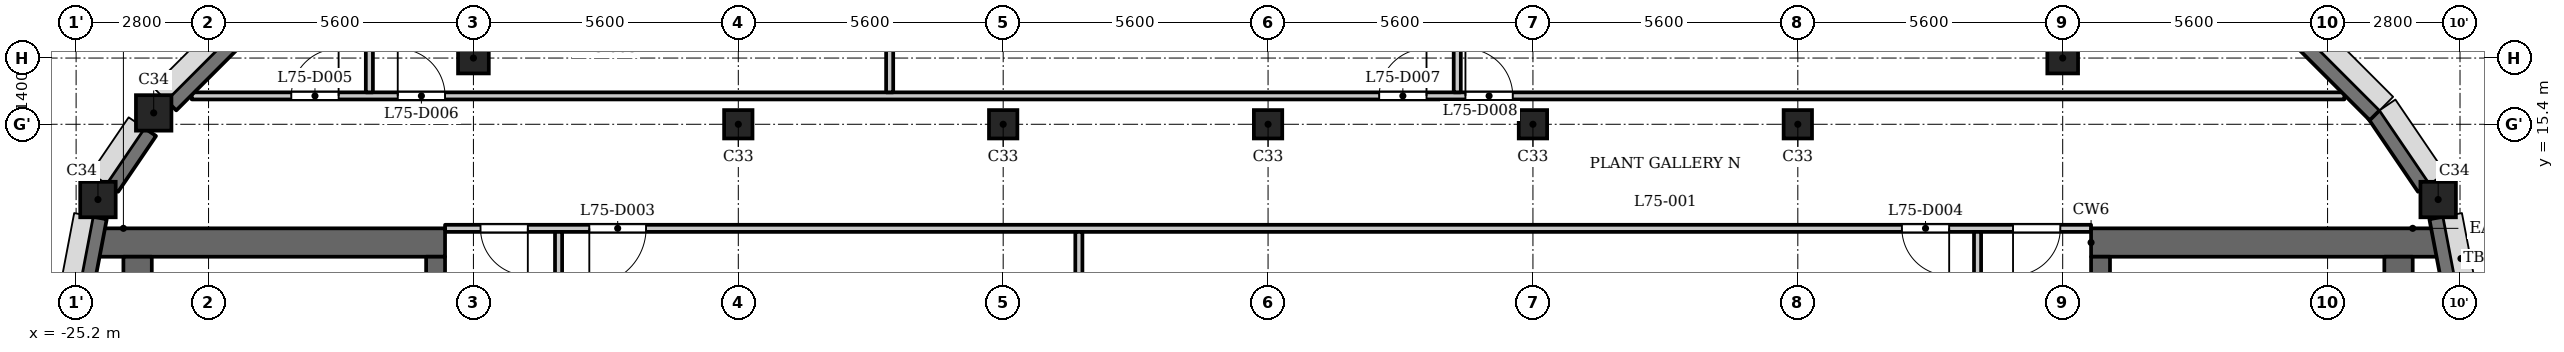
"""IFC4 building model, lengths in metres.
Left out: names, types, materials, properties, quantities, classifications, styles, units other than length and angle.
Written with IfcOpenShell. Run it as: python <this file> out.ifc"""

import sys

from ifc_helpers import new_model, si_unit, direction, frame, frame_2d, origin, origin_2d, place, context, subcontext, project, spatial, rectangle, extrude, element, fill, save


model = new_model("IFC4")
c1 = context("Model", 3, precision=1e-05, world=origin(), true_north=direction((0.0, 1.0)))
c2 = subcontext(c1, "Body", "Model", "MODEL_VIEW")
j1 = project(units=[si_unit("LENGTHUNIT", "METRE"), si_unit("PLANEANGLEUNIT", "RADIAN")], contexts=[c1])
p1 = place(None, origin())
s1 = spatial("IfcSite", under=j1, at=p1, CompositionType="ELEMENT")
p2 = place(p1, origin())
s2 = spatial("IfcBuilding", under=s1, at=p2, CompositionType="ELEMENT")
p3 = place(p2, frame((0.0, 0.0, 289.1)))
s3 = spatial("IfcBuildingStorey", under=s2, at=p3, CompositionType="ELEMENT", Elevation=289.1)
for number, where, z_axis, x_axis in (
    (1, (24.738, 13.809, 0.0), (0.0, 0.0, 1.0), (1.0, 0.0, 0.0)),
    (2, (-23.56, 15.64, 0.0), (0.0, 0.0, 1.0), (1.0, 0.0, 0.0)),
    (3, (-24.738, 13.809, 0.0), (0.0, 0.0, 1.0), (1.0, 0.0, 0.0)),
):
    element("IfcColumn", number, at=place(p3, frame(where, z_axis=z_axis, x_axis=x_axis)), inside=s3, PredefinedType="COLUMN", context=c2, shape_type="SweptSolid", body=[
        extrude(rectangle(XDim=0.75, YDim=0.75, at=origin_2d()), origin(), (0.0, 0.0, 1.0), 5.4),
    ])
for number, where, z_axis, x_axis in (
    (4, (-16.8, 16.8, 0.0), (0.0, 0.0, 1.0), (1.0, 0.0, 0.0)),
    (5, (16.8, 16.8, 0.0), (0.0, 0.0, 1.0), (1.0, 0.0, 0.0)),
):
    element("IfcColumn", number, at=place(p3, frame(where, z_axis=z_axis, x_axis=x_axis)), inside=s3, PredefinedType="COLUMN", context=c2, shape_type="SweptSolid", body=[
        extrude(rectangle(XDim=0.65, YDim=0.65, at=origin_2d()), origin(), (0.0, 0.0, 1.0), 5.4),
    ])
for number, where, z_axis, x_axis in (
    (6, (-11.2, 15.4, 0.0), (0.0, 0.0, 1.0), (1.0, 0.0, 0.0)),
    (7, (-5.6, 15.4, 0.0), (0.0, 0.0, 1.0), (1.0, 0.0, 0.0)),
    (8, (0.0, 15.4, 0.0), (0.0, 0.0, 1.0), (1.0, 0.0, 0.0)),
    (9, (5.6, 15.4, 0.0), (0.0, 0.0, 1.0), (1.0, 0.0, 0.0)),
    (10, (11.2, 15.4, 0.0), (0.0, 0.0, 1.0), (1.0, 0.0, 0.0)),
):
    element("IfcColumn", number, at=place(p3, frame(where, z_axis=z_axis, x_axis=x_axis)), inside=s3, PredefinedType="COLUMN", context=c2, shape_type="SweptSolid", body=[
        extrude(rectangle(XDim=0.6, YDim=0.6, at=origin_2d()), origin(), (0.0, 0.0, 1.0), 5.4),
    ])
p4 = place(p3, frame((25.053, 11.572, 0.0), z_axis=(0.0, 0.0, 1.0), x_axis=(-0.187398348234, 0.982284001233, 0.0)))
e11 = element("IfcWall", 11, at=p4, inside=s3, PredefinedType="SOLIDWALL", context=c2, shape_type="SweptSolid", body=[
    extrude(rectangle(XDim=1.881, YDim=0.3, at=frame_2d((0.941, 0.0))), origin(), (0.0, 0.0, 1.0), 3.2),
])
p5 = place(p3, frame((24.436, 14.057, 0.0), z_axis=(0.0, 0.0, 1.0), x_axis=(-0.562075713892, 0.827085782645, 0.0)))
e12 = element("IfcWall", 12, at=p5, inside=s3, PredefinedType="SOLIDWALL", context=c2, shape_type="SweptSolid", body=[
    extrude(rectangle(XDim=1.881, YDim=0.3, at=frame_2d((0.94, 0.0))), origin(), (0.0, 0.0, 1.0), 3.2),
])
for number, where, z_axis, x_axis in (
    (13, (23.397, 15.591, 0.0), (0.0, 0.0, 1.0), (-0.707, 0.707, 0.0)),
    (14, (-21.191, 17.797, 0.0), (0.0, 0.0, 1.0), (-0.707, -0.707, 0.0)),
):
    element("IfcWall", number, at=place(p3, frame(where, z_axis=z_axis, x_axis=x_axis)), inside=s3, PredefinedType="SOLIDWALL", context=c2, shape_type="SweptSolid", body=[
        extrude(rectangle(XDim=2.825, YDim=0.3, at=frame_2d((1.413, 0.0))), origin(), (0.0, 0.0, 1.0), 3.2),
    ])
p6 = place(p3, frame((-23.634, 15.237, 0.0), z_axis=(0.0, 0.0, 1.0), x_axis=(-0.562099454787, -0.827069648173, 0.0)))
e15 = element("IfcWall", 15, at=p6, inside=s3, PredefinedType="SOLIDWALL", context=c2, shape_type="SweptSolid", body=[
    extrude(rectangle(XDim=1.427, YDim=0.3, at=frame_2d((0.714, 0.0))), origin(), (0.0, 0.0, 1.0), 3.2),
])
p7 = place(p3, frame((-24.7, 13.42, 0.0), z_axis=(0.0, 0.0, 1.0), x_axis=(-0.187398348234, -0.982284001233, 0.0)))
e16 = element("IfcWall", 16, at=p7, inside=s3, PredefinedType="SOLIDWALL", context=c2, shape_type="SweptSolid", body=[
    extrude(rectangle(XDim=1.881, YDim=0.3, at=frame_2d((0.941, 0.0))), origin(), (0.0, 0.0, 1.0), 3.2),
])
p8 = place(p3, frame((-17.4, 12.9, 0.0), z_axis=(0.0, 0.0, 1.0), x_axis=(-1.0, 0.0, 0.0)))
e17 = element("IfcWall", 17, at=p8, inside=s3, PredefinedType="SHEAR", context=c2, shape_type="SweptSolid", body=[
    extrude(rectangle(XDim=7.32, YDim=0.6, at=frame_2d((3.66, 0.0))), origin(), (0.0, 0.0, 1.0), 5.0),
])
p9 = place(p3, frame((-17.6, -12.6, 0.0), z_axis=(0.0, 0.0, 1.0), x_axis=(0.0, 1.0, 0.0)))
e18 = element("IfcWall", 18, at=p9, inside=s3, PredefinedType="SHEAR", context=c2, shape_type="SweptSolid", body=[
    extrude(rectangle(XDim=25.2, YDim=0.4, at=frame_2d((12.6, 0.0))), origin(), (0.0, 0.0, 1.0), 5.0),
])
p10 = place(p9, frame((6.3, 0.0, 0.0)))
e19 = element("IfcOpeningElement", 19, at=p10, cuts=e18, PredefinedType="OPENING", context=c2, shape_type="SweptSolid", body=[
    extrude(rectangle(XDim=1.1, YDim=2.1, at=frame_2d((0.55, 1.05))), frame((0.0, 0.21, 0.0), z_axis=(0.0, -1.0, 0.0), x_axis=(1.0, 0.0, 0.0)), (0.0, 0.0, 1.0), 0.42),
])
p11 = place(p9, frame((8.7, 0.0, 0.0)))
e20 = element("IfcOpeningElement", 20, at=p11, cuts=e18, PredefinedType="OPENING", context=c2, shape_type="SweptSolid", body=[
    extrude(rectangle(XDim=1.1, YDim=2.1, at=frame_2d((0.55, 1.05))), frame((0.0, 0.21, 0.0), z_axis=(0.0, -1.0, 0.0), x_axis=(1.0, 0.0, 0.0)), (0.0, 0.0, 1.0), 0.42),
])
p12 = place(p9, frame((11.2, 0.0, 0.0)))
e21 = element("IfcOpeningElement", 21, at=p12, cuts=e18, PredefinedType="OPENING", context=c2, shape_type="SweptSolid", body=[
    extrude(rectangle(XDim=0.9, YDim=2.1, at=frame_2d((0.45, 1.05))), frame((0.0, 0.21, 0.0), z_axis=(0.0, -1.0, 0.0), x_axis=(1.0, 0.0, 0.0)), (0.0, 0.0, 1.0), 0.42),
])
p13 = place(p9, frame((17.05, 0.0, 0.0)))
e22 = element("IfcOpeningElement", 22, at=p13, cuts=e18, PredefinedType="OPENING", context=c2, shape_type="SweptSolid", body=[
    extrude(rectangle(XDim=0.9, YDim=2.1, at=frame_2d((0.45, 1.05))), frame((0.0, 0.21, 0.0), z_axis=(0.0, -1.0, 0.0), x_axis=(1.0, 0.0, 0.0)), (0.0, 0.0, 1.0), 0.42),
])
p14 = place(p9, frame((23.25, 0.0, 0.0)))
e23 = element("IfcOpeningElement", 23, at=p14, cuts=e18, PredefinedType="OPENING", context=c2, shape_type="SweptSolid", body=[
    extrude(rectangle(XDim=1.1, YDim=2.1, at=frame_2d((0.55, 1.05))), frame((0.0, 0.21, 0.0), z_axis=(0.0, -1.0, 0.0), x_axis=(1.0, 0.0, 0.0)), (0.0, 0.0, 1.0), 0.42),
])
p15 = place(p9, frame((0.85, 0.0, 0.0)))
e24 = element("IfcOpeningElement", 24, at=p15, cuts=e18, PredefinedType="OPENING", context=c2, shape_type="SweptSolid", body=[
    extrude(rectangle(XDim=1.1, YDim=2.1, at=frame_2d((0.55, 1.05))), frame((0.0, 0.21, 0.0), z_axis=(0.0, -1.0, 0.0), x_axis=(1.0, 0.0, 0.0)), (0.0, 0.0, 1.0), 0.42),
])
p16 = place(p9, frame((13.075, 0.0, 0.0)))
e25 = element("IfcOpeningElement", 25, at=p16, cuts=e18, PredefinedType="OPENING", context=c2, shape_type="SweptSolid", body=[
    extrude(rectangle(XDim=1.8, YDim=2.1, at=frame_2d((0.9, 1.05))), frame((0.0, 0.21, 0.0), z_axis=(0.0, -1.0, 0.0), x_axis=(1.0, 0.0, 0.0)), (0.0, 0.0, 1.0), 0.42),
])
p17 = place(p3, frame((-23.9, -12.6, 0.0), z_axis=(0.0, 0.0, 1.0), x_axis=(0.0, 1.0, 0.0)))
e26 = element("IfcWall", 26, at=p17, inside=s3, PredefinedType="SHEAR", context=c2, shape_type="SweptSolid", body=[
    extrude(rectangle(XDim=25.2, YDim=0.6, at=frame_2d((12.6, 0.0))), origin(), (0.0, 0.0, 1.0), 5.0),
])
p18 = place(p3, frame((17.4, 12.9, 0.0), z_axis=(0.0, 0.0, 1.0), x_axis=(1.0, 0.0, 0.0)))
e27 = element("IfcWall", 27, at=p18, inside=s3, PredefinedType="SHEAR", context=c2, shape_type="SweptSolid", body=[
    extrude(rectangle(XDim=7.32, YDim=0.6, at=frame_2d((3.66, 0.0))), origin(), (0.0, 0.0, 1.0), 5.0),
])
p19 = place(p3, frame((17.6, -12.6, 0.0), z_axis=(0.0, 0.0, 1.0), x_axis=(0.0, 1.0, 0.0)))
e28 = element("IfcWall", 28, at=p19, inside=s3, PredefinedType="SHEAR", context=c2, shape_type="SweptSolid", body=[
    extrude(rectangle(XDim=25.2, YDim=0.4, at=frame_2d((12.6, 0.0))), origin(), (0.0, 0.0, 1.0), 5.0),
])
p20 = place(p19, frame((6.3, 0.0, 0.0)))
e29 = element("IfcOpeningElement", 29, at=p20, cuts=e28, PredefinedType="OPENING", context=c2, shape_type="SweptSolid", body=[
    extrude(rectangle(XDim=1.1, YDim=2.1, at=frame_2d((0.55, 1.05))), frame((0.0, 0.21, 0.0), z_axis=(0.0, -1.0, 0.0), x_axis=(1.0, 0.0, 0.0)), (0.0, 0.0, 1.0), 0.42),
])
p21 = place(p19, frame((8.7, 0.0, 0.0)))
e30 = element("IfcOpeningElement", 30, at=p21, cuts=e28, PredefinedType="OPENING", context=c2, shape_type="SweptSolid", body=[
    extrude(rectangle(XDim=1.1, YDim=2.1, at=frame_2d((0.55, 1.05))), frame((0.0, 0.21, 0.0), z_axis=(0.0, -1.0, 0.0), x_axis=(1.0, 0.0, 0.0)), (0.0, 0.0, 1.0), 0.42),
])
p22 = place(p19, frame((11.2, 0.0, 0.0)))
e31 = element("IfcOpeningElement", 31, at=p22, cuts=e28, PredefinedType="OPENING", context=c2, shape_type="SweptSolid", body=[
    extrude(rectangle(XDim=0.9, YDim=2.1, at=frame_2d((0.45, 1.05))), frame((0.0, 0.21, 0.0), z_axis=(0.0, -1.0, 0.0), x_axis=(1.0, 0.0, 0.0)), (0.0, 0.0, 1.0), 0.42),
])
p23 = place(p19, frame((17.05, 0.0, 0.0)))
e32 = element("IfcOpeningElement", 32, at=p23, cuts=e28, PredefinedType="OPENING", context=c2, shape_type="SweptSolid", body=[
    extrude(rectangle(XDim=0.9, YDim=2.1, at=frame_2d((0.45, 1.05))), frame((0.0, 0.21, 0.0), z_axis=(0.0, -1.0, 0.0), x_axis=(1.0, 0.0, 0.0)), (0.0, 0.0, 1.0), 0.42),
])
p24 = place(p19, frame((23.25, 0.0, 0.0)))
e33 = element("IfcOpeningElement", 33, at=p24, cuts=e28, PredefinedType="OPENING", context=c2, shape_type="SweptSolid", body=[
    extrude(rectangle(XDim=1.1, YDim=2.1, at=frame_2d((0.55, 1.05))), frame((0.0, 0.21, 0.0), z_axis=(0.0, -1.0, 0.0), x_axis=(1.0, 0.0, 0.0)), (0.0, 0.0, 1.0), 0.42),
])
p25 = place(p19, frame((0.85, 0.0, 0.0)))
e34 = element("IfcOpeningElement", 34, at=p25, cuts=e28, PredefinedType="OPENING", context=c2, shape_type="SweptSolid", body=[
    extrude(rectangle(XDim=1.1, YDim=2.1, at=frame_2d((0.55, 1.05))), frame((0.0, 0.21, 0.0), z_axis=(0.0, -1.0, 0.0), x_axis=(1.0, 0.0, 0.0)), (0.0, 0.0, 1.0), 0.42),
])
p26 = place(p19, frame((13.075, 0.0, 0.0)))
e35 = element("IfcOpeningElement", 35, at=p26, cuts=e28, PredefinedType="OPENING", context=c2, shape_type="SweptSolid", body=[
    extrude(rectangle(XDim=1.8, YDim=2.1, at=frame_2d((0.9, 1.05))), frame((0.0, 0.21, 0.0), z_axis=(0.0, -1.0, 0.0), x_axis=(1.0, 0.0, 0.0)), (0.0, 0.0, 1.0), 0.42),
])
p27 = place(p3, frame((23.9, -12.6, 0.0), z_axis=(0.0, 0.0, 1.0), x_axis=(0.0, 1.0, 0.0)))
e36 = element("IfcWall", 36, at=p27, inside=s3, PredefinedType="SHEAR", context=c2, shape_type="SweptSolid", body=[
    extrude(rectangle(XDim=25.2, YDim=0.6, at=frame_2d((12.6, 0.0))), origin(), (0.0, 0.0, 1.0), 5.0),
])
p28 = place(p3, frame((-17.4, 13.2, 0.0), z_axis=(0.0, 0.0, 1.0), x_axis=(1.0, 0.0, 0.0)))
e37 = element("IfcWall", 37, at=p28, inside=s3, PredefinedType="PARTITIONING", context=c2, shape_type="SweptSolid", body=[
    extrude(rectangle(XDim=34.8, YDim=0.15, at=frame_2d((17.4, 0.0))), origin(), (0.0, 0.0, 1.0), 5.0),
])
p29 = place(p28, frame((0.75, 0.0, 0.0)))
e38 = element("IfcOpeningElement", 38, at=p29, cuts=e37, PredefinedType="OPENING", context=c2, shape_type="SweptSolid", body=[
    extrude(rectangle(XDim=1.0, YDim=2.1, at=frame_2d((0.5, 1.05))), frame((0.0, 0.085, 0.0), z_axis=(0.0, -1.0, 0.0), x_axis=(1.0, 0.0, 0.0)), (0.0, 0.0, 1.0), 0.17),
])
p30 = place(p28, frame((33.15, 0.0, 0.0)))
e39 = element("IfcOpeningElement", 39, at=p30, cuts=e37, PredefinedType="OPENING", context=c2, shape_type="SweptSolid", body=[
    extrude(rectangle(XDim=1.0, YDim=2.1, at=frame_2d((0.5, 1.05))), frame((0.0, 0.085, 0.0), z_axis=(0.0, -1.0, 0.0), x_axis=(1.0, 0.0, 0.0)), (0.0, 0.0, 1.0), 0.17),
])
p31 = place(p28, frame((3.05, 0.0, 0.0)))
e40 = element("IfcOpeningElement", 40, at=p31, cuts=e37, PredefinedType="OPENING", context=c2, shape_type="SweptSolid", body=[
    extrude(rectangle(XDim=1.2, YDim=2.1, at=frame_2d((0.6, 1.05))), frame((0.0, 0.085, 0.0), z_axis=(0.0, -1.0, 0.0), x_axis=(1.0, 0.0, 0.0)), (0.0, 0.0, 1.0), 0.17),
])
p32 = place(p28, frame((30.8, 0.0, 0.0)))
e41 = element("IfcOpeningElement", 41, at=p32, cuts=e37, PredefinedType="OPENING", context=c2, shape_type="SweptSolid", body=[
    extrude(rectangle(XDim=1.0, YDim=2.1, at=frame_2d((0.5, 1.05))), frame((0.0, 0.085, 0.0), z_axis=(0.0, -1.0, 0.0), x_axis=(1.0, 0.0, 0.0)), (0.0, 0.0, 1.0), 0.17),
])
p33 = place(p3, frame((-22.756, 16.0, 0.0), z_axis=(0.0, 0.0, 1.0), x_axis=(1.0, 0.0, 0.0)))
e42 = element("IfcWall", 42, at=p33, inside=s3, PredefinedType="PARTITIONING", context=c2, shape_type="SweptSolid", body=[
    extrude(rectangle(XDim=45.511, YDim=0.15, at=frame_2d((22.756, 0.0))), origin(), (0.0, 0.0, 1.0), 5.0),
])
p34 = place(p33, frame((2.106, 0.0, 0.0)))
e43 = element("IfcOpeningElement", 43, at=p34, cuts=e42, PredefinedType="OPENING", context=c2, shape_type="SweptSolid", body=[
    extrude(rectangle(XDim=1.0, YDim=2.1, at=frame_2d((0.5, 1.05))), frame((0.0, 0.085, 0.0), z_axis=(0.0, -1.0, 0.0), x_axis=(1.0, 0.0, 0.0)), (0.0, 0.0, 1.0), 0.17),
])
p35 = place(p33, frame((4.356, 0.0, 0.0)))
e44 = element("IfcOpeningElement", 44, at=p35, cuts=e42, PredefinedType="OPENING", context=c2, shape_type="SweptSolid", body=[
    extrude(rectangle(XDim=1.0, YDim=2.1, at=frame_2d((0.5, 1.05))), frame((0.0, 0.085, 0.0), z_axis=(0.0, -1.0, 0.0), x_axis=(1.0, 0.0, 0.0)), (0.0, 0.0, 1.0), 0.17),
])
p36 = place(p33, frame((25.106, 0.0, 0.0)))
e45 = element("IfcOpeningElement", 45, at=p36, cuts=e42, PredefinedType="OPENING", context=c2, shape_type="SweptSolid", body=[
    extrude(rectangle(XDim=1.0, YDim=2.1, at=frame_2d((0.5, 1.05))), frame((0.0, 0.085, 0.0), z_axis=(0.0, -1.0, 0.0), x_axis=(1.0, 0.0, 0.0)), (0.0, 0.0, 1.0), 0.17),
])
p37 = place(p33, frame((26.929, 0.0, 0.0)))
e46 = element("IfcOpeningElement", 46, at=p37, cuts=e42, PredefinedType="OPENING", context=c2, shape_type="SweptSolid", body=[
    extrude(rectangle(XDim=1.0, YDim=2.1, at=frame_2d((0.5, 1.05))), frame((0.0, 0.085, 0.0), z_axis=(0.0, -1.0, 0.0), x_axis=(1.0, 0.0, 0.0)), (0.0, 0.0, 1.0), 0.17),
])
p38 = place(p3, frame((-19.0, 16.075, 0.0), z_axis=(0.0, 0.0, 1.0), x_axis=(0.0, 1.0, 0.0)))
e47 = element("IfcWall", 47, at=p38, inside=s3, PredefinedType="PARTITIONING", context=c2, shape_type="SweptSolid", body=[
    extrude(rectangle(XDim=2.902, YDim=0.15, at=frame_2d((1.451, 0.0))), origin(), (0.0, 0.0, 1.0), 5.0),
])
p39 = place(p3, frame((-15.0, 6.769, 0.0), z_axis=(0.0, 0.0, 1.0), x_axis=(0.0, 1.0, 0.0)))
e48 = element("IfcWall", 48, at=p39, inside=s3, PredefinedType="PARTITIONING", context=c2, shape_type="SweptSolid", body=[
    extrude(rectangle(XDim=6.356, YDim=0.15, at=frame_2d((3.178, 0.0))), origin(), (0.0, 0.0, 1.0), 5.0),
])
p40 = place(p3, frame((-8.0, 16.075, 0.0), z_axis=(0.0, 0.0, 1.0), x_axis=(0.0, 1.0, 0.0)))
e49 = element("IfcWall", 49, at=p40, inside=s3, PredefinedType="PARTITIONING", context=c2, shape_type="SweptSolid", body=[
    extrude(rectangle(XDim=3.205, YDim=0.15, at=frame_2d((1.603, 0.0))), origin(), (0.0, 0.0, 1.0), 5.0),
])
p41 = place(p3, frame((-4.0, 7.32, 0.0), z_axis=(0.0, 0.0, 1.0), x_axis=(0.0, 1.0, 0.0)))
e50 = element("IfcWall", 50, at=p41, inside=s3, PredefinedType="PARTITIONING", context=c2, shape_type="SweptSolid", body=[
    extrude(rectangle(XDim=5.805, YDim=0.15, at=frame_2d((2.902, 0.0))), origin(), (0.0, 0.0, 1.0), 5.0),
])
p42 = place(p3, frame((4.0, 16.075, 0.0), z_axis=(0.0, 0.0, 1.0), x_axis=(0.0, 1.0, 0.0)))
e51 = element("IfcWall", 51, at=p42, inside=s3, PredefinedType="PARTITIONING", context=c2, shape_type="SweptSolid", body=[
    extrude(rectangle(XDim=3.205, YDim=0.15, at=frame_2d((1.603, 0.0))), origin(), (0.0, 0.0, 1.0), 5.0),
])
p43 = place(p3, frame((15.0, 6.769, 0.0), z_axis=(0.0, 0.0, 1.0), x_axis=(0.0, 1.0, 0.0)))
e52 = element("IfcWall", 52, at=p43, inside=s3, PredefinedType="PARTITIONING", context=c2, shape_type="SweptSolid", body=[
    extrude(rectangle(XDim=6.356, YDim=0.15, at=frame_2d((3.178, 0.0))), origin(), (0.0, 0.0, 1.0), 5.0),
])
p44 = place(p29, origin())
e53 = element("IfcDoor", 53, at=p44, inside=s3, OperationType="SINGLE_SWING_RIGHT", PredefinedType="DOOR", context=c2, shape_type="SweptSolid", body=[
    extrude(rectangle(XDim=1.0, YDim=2.1, at=frame_2d((0.5, 1.05))), frame((0.0, 0.025, 0.0), z_axis=(0.0, -1.0, 0.0), x_axis=(1.0, 0.0, 0.0)), (0.0, 0.0, 1.0), 0.05),
])
fill(e38, e53)
p45 = place(p30, origin())
e54 = element("IfcDoor", 54, at=p45, inside=s3, OperationType="SINGLE_SWING_LEFT", PredefinedType="DOOR", context=c2, shape_type="SweptSolid", body=[
    extrude(rectangle(XDim=1.0, YDim=2.1, at=frame_2d((0.5, 1.05))), frame((0.0, 0.025, 0.0), z_axis=(0.0, -1.0, 0.0), x_axis=(1.0, 0.0, 0.0)), (0.0, 0.0, 1.0), 0.05),
])
fill(e39, e54)
p46 = place(p31, origin())
e55 = element("IfcDoor", 55, at=p46, inside=s3, OperationType="SINGLE_SWING_LEFT", PredefinedType="DOOR", context=c2, shape_type="SweptSolid", body=[
    extrude(rectangle(XDim=1.2, YDim=2.1, at=frame_2d((0.6, 1.05))), frame((0.0, 0.025, 0.0), z_axis=(0.0, -1.0, 0.0), x_axis=(1.0, 0.0, 0.0)), (0.0, 0.0, 1.0), 0.05),
])
fill(e40, e55)
p47 = place(p32, origin())
e56 = element("IfcDoor", 56, at=p47, inside=s3, OperationType="SINGLE_SWING_RIGHT", PredefinedType="DOOR", context=c2, shape_type="SweptSolid", body=[
    extrude(rectangle(XDim=1.0, YDim=2.1, at=frame_2d((0.5, 1.05))), frame((0.0, 0.025, 0.0), z_axis=(0.0, -1.0, 0.0), x_axis=(1.0, 0.0, 0.0)), (0.0, 0.0, 1.0), 0.05),
])
fill(e41, e56)
p48 = place(p34, origin())
e57 = element("IfcDoor", 57, at=p48, inside=s3, OperationType="SINGLE_SWING_LEFT", PredefinedType="DOOR", context=c2, shape_type="SweptSolid", body=[
    extrude(rectangle(XDim=1.0, YDim=2.1, at=frame_2d((0.5, 1.05))), frame((0.0, 0.025, 0.0), z_axis=(0.0, -1.0, 0.0), x_axis=(1.0, 0.0, 0.0)), (0.0, 0.0, 1.0), 0.05),
])
fill(e43, e57)
p49 = place(p35, origin())
e58 = element("IfcDoor", 58, at=p49, inside=s3, OperationType="SINGLE_SWING_RIGHT", PredefinedType="DOOR", context=c2, shape_type="SweptSolid", body=[
    extrude(rectangle(XDim=1.0, YDim=2.1, at=frame_2d((0.5, 1.05))), frame((0.0, 0.025, 0.0), z_axis=(0.0, -1.0, 0.0), x_axis=(1.0, 0.0, 0.0)), (0.0, 0.0, 1.0), 0.05),
])
fill(e44, e58)
p50 = place(p36, origin())
e59 = element("IfcDoor", 59, at=p50, inside=s3, OperationType="SINGLE_SWING_LEFT", PredefinedType="DOOR", context=c2, shape_type="SweptSolid", body=[
    extrude(rectangle(XDim=1.0, YDim=2.1, at=frame_2d((0.5, 1.05))), frame((0.0, 0.025, 0.0), z_axis=(0.0, -1.0, 0.0), x_axis=(1.0, 0.0, 0.0)), (0.0, 0.0, 1.0), 0.05),
])
fill(e45, e59)
p51 = place(p37, origin())
e60 = element("IfcDoor", 60, at=p51, inside=s3, OperationType="SINGLE_SWING_RIGHT", PredefinedType="DOOR", context=c2, shape_type="SweptSolid", body=[
    extrude(rectangle(XDim=1.0, YDim=2.1, at=frame_2d((0.5, 1.05))), frame((0.0, 0.025, 0.0), z_axis=(0.0, -1.0, 0.0), x_axis=(1.0, 0.0, 0.0)), (0.0, 0.0, 1.0), 0.05),
])
fill(e46, e60)
save(model, sys.argv[1])
